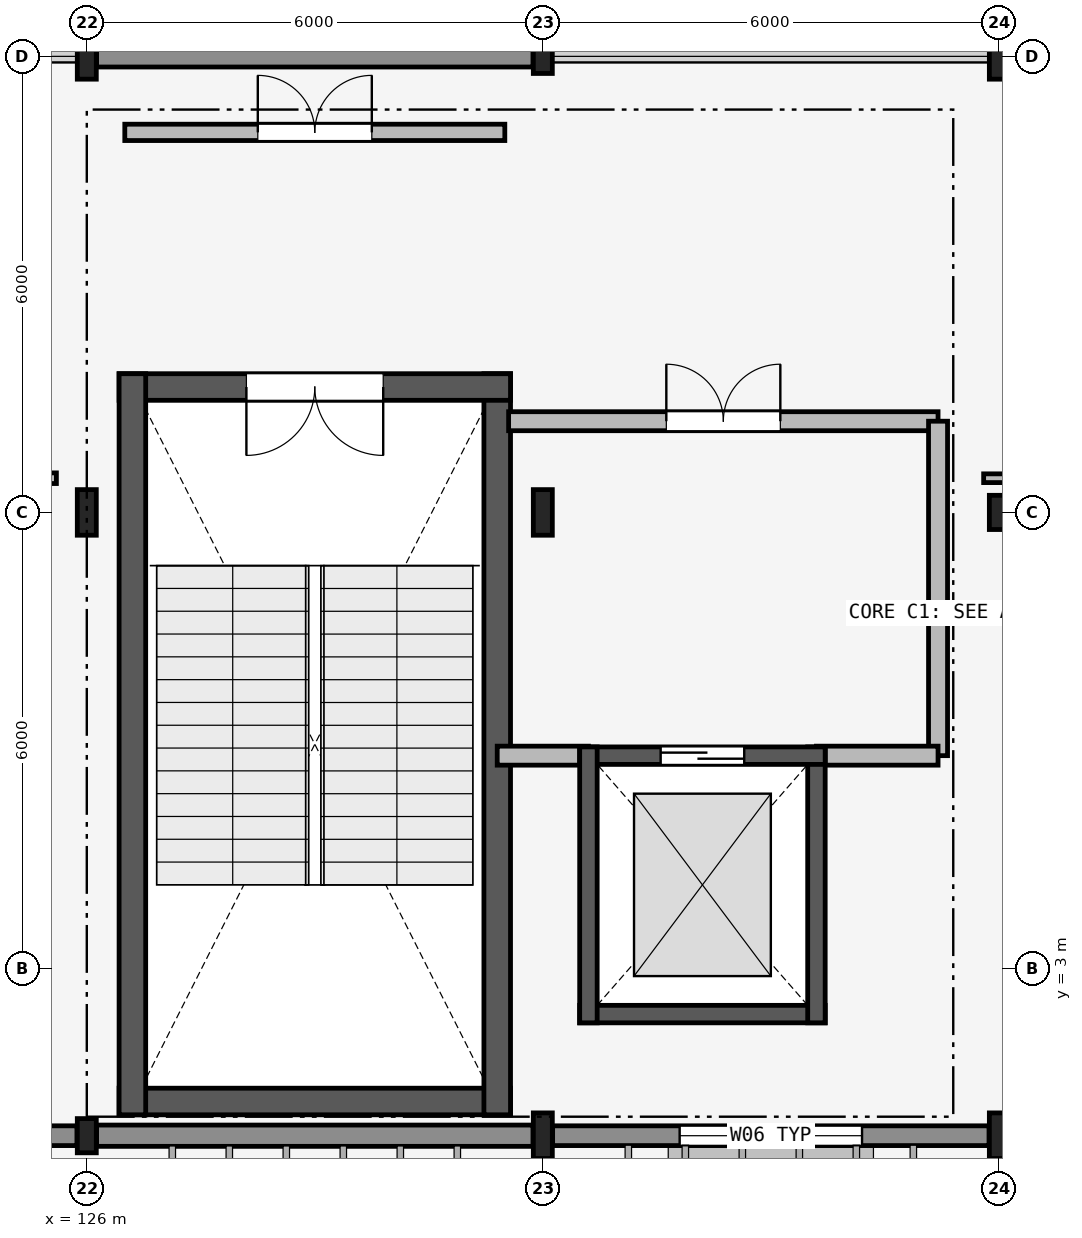
"""IFC4 building model, lengths in metres.
Left out: names, types, materials, properties, quantities, classifications, styles, units other than length and angle.
Written with IfcOpenShell. Run it as: python <this file> out.ifc"""

import sys

from ifc_helpers import new_model, si_unit, direction, frame, frame_2d, origin, origin_2d, place, context, subcontext, project, spatial, rectangle, i_section, extrude, element, fill, save


model = new_model("IFC4")
c1 = context("Model", 3, precision=1e-05, world=origin(), true_north=direction((0.0, 1.0)))
c2 = subcontext(c1, "Body", "Model", "MODEL_VIEW")
j1 = project(units=[si_unit("LENGTHUNIT", "METRE"), si_unit("PLANEANGLEUNIT", "RADIAN")], contexts=[c1])
p1 = place(None, origin())
s1 = spatial("IfcSite", under=j1, at=p1, CompositionType="ELEMENT")
p2 = place(p1, origin())
s2 = spatial("IfcBuilding", under=s1, at=p2, CompositionType="ELEMENT")
p3 = place(p2, frame((0.0, 0.0, 4.8)))
s3 = spatial("IfcBuildingStorey", under=s2, at=p3, CompositionType="ELEMENT", Elevation=4.8)
p4 = place(p3, frame((126.0, 0.8, 0.0), z_axis=(0.0, 0.0, 1.0), x_axis=(1.0, 0.0, 0.0)))
e1 = element("IfcColumn", 1, at=p4, inside=s3, PredefinedType="COLUMN", context=c2, shape_type="SweptSolid", body=[
    extrude(i_section(OverallWidth=0.25, OverallDepth=0.45, WebThickness=0.011, FlangeThickness=0.014, FilletRadius=0.015, at=origin_2d()), origin(), (0.0, 0.0, 1.0), 4.5),
])
for number, where, z_axis, x_axis in (
    (2, (126.0, 9.0, 0.0), (0.0, 0.0, 1.0), (1.0, 0.0, 0.0)),
    (3, (126.0, 15.0, 0.0), (0.0, 0.0, 1.0), (1.0, 0.0, 0.0)),
    (4, (132.0, 0.8, 0.0), (0.0, 0.0, 1.0), (1.0, 0.0, 0.0)),
    (5, (132.0, 9.0, 0.0), (0.0, 0.0, 1.0), (1.0, 0.0, 0.0)),
):
    element("IfcColumn", number, at=place(p3, frame(where, z_axis=z_axis, x_axis=x_axis)), inside=s3, PredefinedType="COLUMN", context=c2, shape_type="SweptSolid", body=[
        extrude(i_section(OverallWidth=0.25, OverallDepth=0.6, WebThickness=0.012, FlangeThickness=0.024, FilletRadius=0.017, at=origin_2d()), origin(), (0.0, 0.0, 1.0), 4.5),
    ])
p5 = place(p3, frame((132.0, 15.0, 0.0), z_axis=(0.0, 0.0, 1.0), x_axis=(1.0, 0.0, 0.0)))
e6 = element("IfcColumn", 6, at=p5, inside=s3, PredefinedType="COLUMN", context=c2, shape_type="SweptSolid", body=[
    extrude(i_section(OverallWidth=0.25, OverallDepth=0.45, WebThickness=0.011, FlangeThickness=0.014, FilletRadius=0.015, at=origin_2d()), origin(), (0.0, 0.0, 1.0), 4.5),
])
p6 = place(p3, frame((138.0, 0.8, 0.0), z_axis=(0.0, 0.0, 1.0), x_axis=(1.0, 0.0, 0.0)))
e7 = element("IfcColumn", 7, at=p6, inside=s3, PredefinedType="COLUMN", context=c2, shape_type="SweptSolid", body=[
    extrude(i_section(OverallWidth=0.25, OverallDepth=0.6, WebThickness=0.012, FlangeThickness=0.024, FilletRadius=0.017, at=origin_2d()), origin(), (0.0, 0.0, 1.0), 4.5),
])
p7 = place(p3, frame((138.0, 9.0, 0.0), z_axis=(0.0, 0.0, 1.0), x_axis=(1.0, 0.0, 0.0)))
e8 = element("IfcColumn", 8, at=p7, inside=s3, PredefinedType="COLUMN", context=c2, shape_type="SweptSolid", body=[
    extrude(i_section(OverallWidth=0.25, OverallDepth=0.45, WebThickness=0.011, FlangeThickness=0.014, FilletRadius=0.015, at=origin_2d()), origin(), (0.0, 0.0, 1.0), 4.5),
])
p8 = place(p3, frame((138.0, 15.0, 0.0), z_axis=(0.0, 0.0, 1.0), x_axis=(1.0, 0.0, 0.0)))
e9 = element("IfcColumn", 9, at=p8, inside=s3, PredefinedType="COLUMN", context=c2, shape_type="SweptSolid", body=[
    extrude(i_section(OverallWidth=0.25, OverallDepth=0.6, WebThickness=0.012, FlangeThickness=0.024, FilletRadius=0.017, at=origin_2d()), origin(), (0.0, 0.0, 1.0), 4.5),
])
p9 = place(p3, frame((120.129, 0.8, 0.0), z_axis=(0.0, 0.0, 1.0), x_axis=(1.0, 0.0, 0.0)))
e10 = element("IfcWall", 10, at=p9, inside=s3, PredefinedType="SOLIDWALL", context=c2, shape_type="SweptSolid", body=[
    extrude(rectangle(XDim=5.742, YDim=0.26, at=frame_2d((2.871, 0.0))), origin(), (0.0, 0.0, 1.0), 3.79),
])
p10 = place(p9, frame((1.671, 0.0, 0.9)))
e11 = element("IfcOpeningElement", 11, at=p10, cuts=e10, PredefinedType="OPENING", context=c2, shape_type="SweptSolid", body=[
    extrude(rectangle(XDim=2.4, YDim=1.5, at=frame_2d((1.2, 0.75))), frame((0.0, 0.14, 0.0), z_axis=(0.0, -1.0, 0.0), x_axis=(1.0, 0.0, 0.0)), (0.0, 0.0, 1.0), 0.28),
])
p11 = place(p3, frame((126.129, 0.8, 0.0), z_axis=(0.0, 0.0, 1.0), x_axis=(1.0, 0.0, 0.0)))
e12 = element("IfcWall", 12, at=p11, inside=s3, PredefinedType="SOLIDWALL", context=c2, shape_type="SweptSolid", body=[
    extrude(rectangle(XDim=5.742, YDim=0.28, at=frame_2d((2.871, 0.0))), origin(), (0.0, 0.0, 1.0), 3.79),
])
p12 = place(p3, frame((132.129, 0.8, 0.0), z_axis=(0.0, 0.0, 1.0), x_axis=(1.0, 0.0, 0.0)))
e13 = element("IfcWall", 13, at=p12, inside=s3, PredefinedType="SOLIDWALL", context=c2, shape_type="SweptSolid", body=[
    extrude(rectangle(XDim=5.742, YDim=0.26, at=frame_2d((2.871, 0.0))), origin(), (0.0, 0.0, 1.0), 3.79),
])
p13 = place(p12, frame((1.671, 0.0, 1.1)))
e14 = element("IfcOpeningElement", 14, at=p13, cuts=e13, PredefinedType="OPENING", context=c2, shape_type="SweptSolid", body=[
    extrude(rectangle(XDim=2.4, YDim=1.2, at=frame_2d((1.2, 0.6))), frame((0.0, 0.14, 0.0), z_axis=(0.0, -1.0, 0.0), x_axis=(1.0, 0.0, 0.0)), (0.0, 0.0, 1.0), 0.28),
])
p14 = place(p3, frame((126.129, 15.0, 0.0), z_axis=(0.0, 0.0, 1.0), x_axis=(1.0, 0.0, 0.0)))
e15 = element("IfcWall", 15, at=p14, inside=s3, PredefinedType="SOLIDWALL", context=c2, shape_type="SweptSolid", body=[
    extrude(rectangle(XDim=5.742, YDim=0.28, at=frame_2d((2.871, 0.0))), origin(), (0.0, 0.0, 1.0), 3.59),
])
p15 = place(p3, frame((126.425, 1.25, 0.0), z_axis=(0.0, 0.0, 1.0), x_axis=(1.0, 0.0, 0.0)))
e16 = element("IfcWall", 16, at=p15, inside=s3, PredefinedType="SHEAR", context=c2, shape_type="SweptSolid", body=[
    extrude(rectangle(XDim=5.15, YDim=0.35, at=frame_2d((2.575, 0.0))), origin(), (0.0, 0.0, 1.0), 4.36),
])
p16 = place(p3, frame((131.4, 1.075, 0.0), z_axis=(0.0, 0.0, 1.0), x_axis=(0.0, 1.0, 0.0)))
e17 = element("IfcWall", 17, at=p16, inside=s3, PredefinedType="SHEAR", context=c2, shape_type="SweptSolid", body=[
    extrude(rectangle(XDim=9.75, YDim=0.35, at=frame_2d((4.875, 0.0))), origin(), (0.0, 0.0, 1.0), 4.36),
])
p17 = place(p3, frame((131.575, 10.65, 0.0), z_axis=(0.0, 0.0, 1.0), x_axis=(-1.0, 0.0, 0.0)))
e18 = element("IfcWall", 18, at=p17, inside=s3, PredefinedType="SHEAR", context=c2, shape_type="SweptSolid", body=[
    extrude(rectangle(XDim=5.15, YDim=0.35, at=frame_2d((2.575, 0.0))), origin(), (0.0, 0.0, 1.0), 4.36),
])
p18 = place(p17, frame((1.675, 0.0, 0.0)))
e19 = element("IfcOpeningElement", 19, at=p18, cuts=e18, PredefinedType="OPENING", context=c2, shape_type="SweptSolid", body=[
    extrude(rectangle(XDim=1.8, YDim=2.2, at=frame_2d((0.9, 1.1))), frame((0.0, 0.185, 0.0), z_axis=(0.0, -1.0, 0.0), x_axis=(1.0, 0.0, 0.0)), (0.0, 0.0, 1.0), 0.37),
])
p19 = place(p3, frame((126.6, 10.825, 0.0), z_axis=(0.0, 0.0, 1.0), x_axis=(0.0, -1.0, 0.0)))
e20 = element("IfcWall", 20, at=p19, inside=s3, PredefinedType="SHEAR", context=c2, shape_type="SweptSolid", body=[
    extrude(rectangle(XDim=9.75, YDim=0.35, at=frame_2d((4.875, 0.0))), origin(), (0.0, 0.0, 1.0), 4.36),
])
p20 = place(p3, frame((126.5, 14.0, 0.0), z_axis=(0.0, 0.0, 1.0), x_axis=(1.0, 0.0, 0.0)))
e21 = element("IfcWall", 21, at=p20, inside=s3, PredefinedType="PARTITIONING", context=c2, shape_type="SweptSolid", body=[
    extrude(rectangle(XDim=5.0, YDim=0.215, at=frame_2d((2.5, 0.0))), origin(), (0.0, 0.0, 1.0), 4.19),
])
p21 = place(p20, frame((1.75, 0.0, 0.0)))
e22 = element("IfcOpeningElement", 22, at=p21, cuts=e21, PredefinedType="OPENING", context=c2, shape_type="SweptSolid", body=[
    extrude(rectangle(XDim=1.5, YDim=2.15, at=frame_2d((0.75, 1.075))), frame((0.0, 0.117, 0.0), z_axis=(0.0, -1.0, 0.0), x_axis=(1.0, 0.0, 0.0)), (0.0, 0.0, 1.0), 0.235),
])
p22 = place(p3, frame((131.55, 10.2, 0.0), z_axis=(0.0, 0.0, 1.0), x_axis=(1.0, 0.0, 0.0)))
e23 = element("IfcWall", 23, at=p22, inside=s3, PredefinedType="PARTITIONING", context=c2, shape_type="SweptSolid", body=[
    extrude(rectangle(XDim=5.65, YDim=0.25, at=frame_2d((2.825, 0.0))), origin(), (0.0, 0.0, 1.0), 3.783),
])
p23 = place(p22, frame((2.075, 0.0, 0.0)))
e24 = element("IfcOpeningElement", 24, at=p23, cuts=e23, PredefinedType="OPENING", context=c2, shape_type="SweptSolid", body=[
    extrude(rectangle(XDim=1.5, YDim=2.15, at=frame_2d((0.75, 1.075))), frame((0.0, 0.135, 0.0), z_axis=(0.0, -1.0, 0.0), x_axis=(1.0, 0.0, 0.0)), (0.0, 0.0, 1.0), 0.27),
])
p24 = place(p3, frame((137.2, 5.8, 0.0), z_axis=(0.0, 0.0, 1.0), x_axis=(0.0, 1.0, 0.0)))
e25 = element("IfcWall", 25, at=p24, inside=s3, PredefinedType="PARTITIONING", context=c2, shape_type="SweptSolid", body=[
    extrude(rectangle(XDim=4.4, YDim=0.25, at=frame_2d((2.2, 0.0))), origin(), (0.0, 0.0, 1.0), 3.59),
])
p25 = place(p3, frame((135.6, 5.8, 0.0), z_axis=(0.0, 0.0, 1.0), x_axis=(1.0, 0.0, 0.0)))
e26 = element("IfcWall", 26, at=p25, inside=s3, PredefinedType="PARTITIONING", context=c2, shape_type="SweptSolid", body=[
    extrude(rectangle(XDim=1.6, YDim=0.25, at=frame_2d((0.8, 0.0))), origin(), (0.0, 0.0, 1.0), 4.19),
])
p26 = place(p3, frame((131.4, 5.8, 0.0), z_axis=(0.0, 0.0, 1.0), x_axis=(1.0, 0.0, 0.0)))
e27 = element("IfcWall", 27, at=p26, inside=s3, PredefinedType="PARTITIONING", context=c2, shape_type="SweptSolid", body=[
    extrude(rectangle(XDim=1.2, YDim=0.25, at=frame_2d((0.6, 0.0))), origin(), (0.0, 0.0, 1.0), 3.79),
])
p27 = place(p3, frame((132.485, 2.4, 0.0), z_axis=(0.0, 0.0, 1.0), x_axis=(1.0, 0.0, 0.0)))
e28 = element("IfcWall", 28, at=p27, inside=s3, PredefinedType="SHEAR", context=c2, shape_type="SweptSolid", body=[
    extrude(rectangle(XDim=3.23, YDim=0.23, at=frame_2d((1.615, 0.0))), origin(), (0.0, 0.0, 1.0), 4.5),
])
p28 = place(p3, frame((135.6, 2.285, 0.0), z_axis=(0.0, 0.0, 1.0), x_axis=(0.0, 1.0, 0.0)))
e29 = element("IfcWall", 29, at=p28, inside=s3, PredefinedType="SHEAR", context=c2, shape_type="SweptSolid", body=[
    extrude(rectangle(XDim=3.63, YDim=0.23, at=frame_2d((1.815, 0.0))), origin(), (0.0, 0.0, 1.0), 4.5),
])
p29 = place(p3, frame((135.715, 5.8, 0.0), z_axis=(0.0, 0.0, 1.0), x_axis=(-1.0, 0.0, 0.0)))
e30 = element("IfcWall", 30, at=p29, inside=s3, PredefinedType="SHEAR", context=c2, shape_type="SweptSolid", body=[
    extrude(rectangle(XDim=3.23, YDim=0.23, at=frame_2d((1.615, 0.0))), origin(), (0.0, 0.0, 1.0), 4.5),
])
p30 = place(p29, frame((1.065, 0.0, 0.0)))
e31 = element("IfcOpeningElement", 31, at=p30, cuts=e30, PredefinedType="OPENING", context=c2, shape_type="SweptSolid", body=[
    extrude(rectangle(XDim=1.1, YDim=2.2, at=frame_2d((0.55, 1.1))), frame((0.0, 0.125, 0.0), z_axis=(0.0, -1.0, 0.0), x_axis=(1.0, 0.0, 0.0)), (0.0, 0.0, 1.0), 0.25),
])
p31 = place(p3, frame((132.6, 5.915, 0.0), z_axis=(0.0, 0.0, 1.0), x_axis=(0.0, -1.0, 0.0)))
e32 = element("IfcWall", 32, at=p31, inside=s3, PredefinedType="SHEAR", context=c2, shape_type="SweptSolid", body=[
    extrude(rectangle(XDim=3.63, YDim=0.23, at=frame_2d((1.815, 0.0))), origin(), (0.0, 0.0, 1.0), 4.5),
])
p32 = place(p3, frame((108.5, 9.45, 0.0), z_axis=(0.0, 0.0, 1.0), x_axis=(1.0, 0.0, 0.0)))
e33 = element("IfcWall", 33, at=p32, inside=s3, PredefinedType="PARTITIONING", context=c2, shape_type="SweptSolid", body=[
    extrude(rectangle(XDim=17.1, YDim=0.14, at=frame_2d((8.55, 0.0))), origin(), (0.0, 0.0, 1.0), 3.783),
])
p33 = place(p32, frame((8.05, 0.0, 0.0)))
e34 = element("IfcOpeningElement", 34, at=p33, cuts=e33, PredefinedType="OPENING", context=c2, shape_type="SweptSolid", body=[
    extrude(rectangle(XDim=1.0, YDim=2.15, at=frame_2d((0.5, 1.075))), frame((0.0, 0.08, 0.0), z_axis=(0.0, -1.0, 0.0), x_axis=(1.0, 0.0, 0.0)), (0.0, 0.0, 1.0), 0.16),
])
p34 = place(p3, frame((137.8, 9.45, 0.0), z_axis=(0.0, 0.0, 1.0), x_axis=(1.0, 0.0, 0.0)))
e35 = element("IfcWall", 35, at=p34, inside=s3, PredefinedType="PARTITIONING", context=c2, shape_type="SweptSolid", body=[
    extrude(rectangle(XDim=22.8, YDim=0.115, at=frame_2d((11.4, 0.0))), origin(), (0.0, 0.0, 1.0), 3.783),
])
p35 = place(p34, frame((10.475, 0.0, 0.0)))
e36 = element("IfcOpeningElement", 36, at=p35, cuts=e35, PredefinedType="OPENING", context=c2, shape_type="SweptSolid", body=[
    extrude(rectangle(XDim=0.95, YDim=2.15, at=frame_2d((0.475, 1.075))), frame((0.0, 0.067, 0.0), z_axis=(0.0, -1.0, 0.0), x_axis=(1.0, 0.0, 0.0)), (0.0, 0.0, 1.0), 0.135),
])
p36 = place(p13, origin())
e37 = element("IfcWindow", 37, at=p36, inside=s3, PartitioningType="SINGLE_PANEL", PredefinedType="WINDOW", context=c2, shape_type="SweptSolid", body=[
    extrude(rectangle(XDim=2.4, YDim=1.2, at=frame_2d((1.2, 0.6))), frame((0.0, 0.03, 0.0), z_axis=(0.0, -1.0, 0.0), x_axis=(1.0, 0.0, 0.0)), (0.0, 0.0, 1.0), 0.06),
])
fill(e14, e37)
p37 = place(p18, origin())
e38 = element("IfcDoor", 38, at=p37, inside=s3, OperationType="DOUBLE_DOOR_SINGLE_SWING", PredefinedType="DOOR", context=c2, shape_type="SweptSolid", body=[
    extrude(rectangle(XDim=1.8, YDim=2.2, at=frame_2d((0.9, 1.1))), frame((0.0, 0.025, 0.0), z_axis=(0.0, -1.0, 0.0), x_axis=(1.0, 0.0, 0.0)), (0.0, 0.0, 1.0), 0.05),
])
fill(e19, e38)
p38 = place(p21, origin())
e39 = element("IfcDoor", 39, at=p38, inside=s3, OperationType="DOUBLE_DOOR_SINGLE_SWING", PredefinedType="DOOR", context=c2, shape_type="SweptSolid", body=[
    extrude(rectangle(XDim=1.5, YDim=2.15, at=frame_2d((0.75, 1.075))), frame((0.0, 0.025, 0.0), z_axis=(0.0, -1.0, 0.0), x_axis=(1.0, 0.0, 0.0)), (0.0, 0.0, 1.0), 0.05),
])
fill(e22, e39)
p39 = place(p23, origin())
e40 = element("IfcDoor", 40, at=p39, inside=s3, OperationType="DOUBLE_DOOR_SINGLE_SWING", PredefinedType="DOOR", context=c2, shape_type="SweptSolid", body=[
    extrude(rectangle(XDim=1.5, YDim=2.15, at=frame_2d((0.75, 1.075))), frame((0.0, 0.025, 0.0), z_axis=(0.0, -1.0, 0.0), x_axis=(1.0, 0.0, 0.0)), (0.0, 0.0, 1.0), 0.05),
])
fill(e24, e40)
p40 = place(p30, origin())
e41 = element("IfcDoor", 41, at=p40, inside=s3, OperationType="SLIDING_TO_LEFT", PredefinedType="DOOR", context=c2, shape_type="SweptSolid", body=[
    extrude(rectangle(XDim=1.1, YDim=2.2, at=frame_2d((0.55, 1.1))), frame((0.0, 0.025, 0.0), z_axis=(0.0, -1.0, 0.0), x_axis=(1.0, 0.0, 0.0)), (0.0, 0.0, 1.0), 0.05),
])
fill(e31, e41)
save(model, sys.argv[1])
